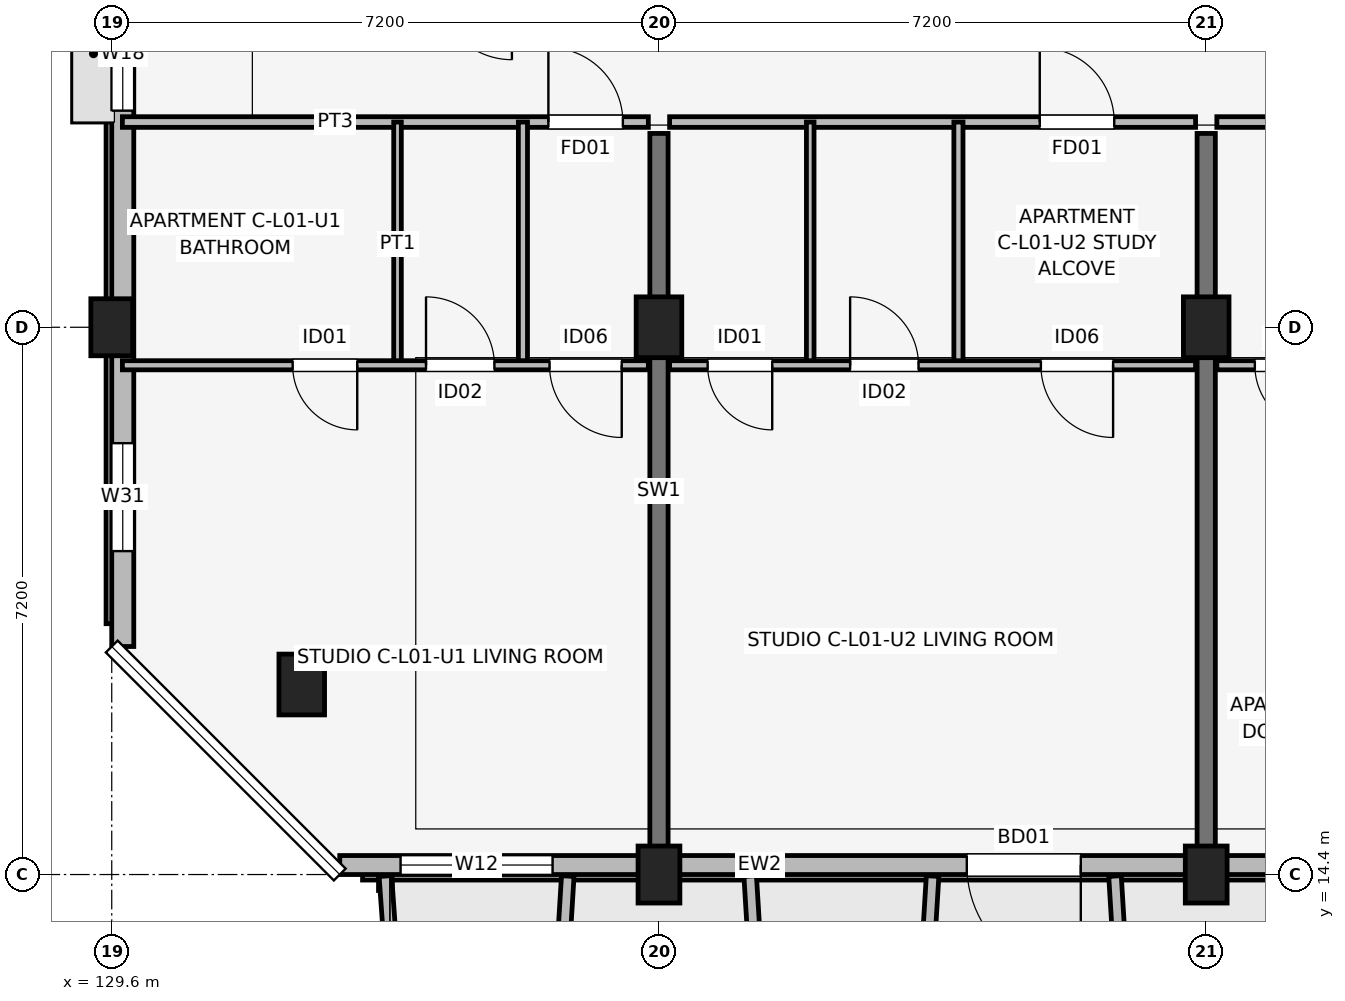
"""IFC4 building model, lengths in metres.
Left out: names, types, materials, properties, quantities, classifications, styles, units other than length and angle.
Written with IfcOpenShell. Run it as: python <this file> out.ifc"""

import sys

from ifc_helpers import new_model, si_unit, direction, frame, frame_2d, origin, origin_2d, place, context, subcontext, project, spatial, rectangle, extrude, element, fill, save


model = new_model("IFC4")
c1 = context("Model", 3, precision=1e-05, world=origin(), true_north=direction((0.0, 1.0)))
c2 = subcontext(c1, "Body", "Model", "MODEL_VIEW")
j1 = project(units=[si_unit("LENGTHUNIT", "METRE"), si_unit("PLANEANGLEUNIT", "RADIAN")], contexts=[c1])
p1 = place(None, origin())
s1 = spatial("IfcSite", under=j1, at=p1, CompositionType="ELEMENT")
p2 = place(p1, origin())
s2 = spatial("IfcBuilding", under=s1, at=p2, CompositionType="ELEMENT")
p3 = place(p2, frame((0.0, 0.0, 4.5)))
s3 = spatial("IfcBuildingStorey", under=s2, at=p3, CompositionType="ELEMENT", Elevation=4.5)
p4 = place(p3, frame((132.1, 16.9, 0.0), z_axis=(0.0, 0.0, 1.0), x_axis=(1.0, 0.0, 0.0)))
e1 = element("IfcColumn", 1, at=p4, inside=s3, PredefinedType="COLUMN", context=c2, shape_type="SweptSolid", body=[
    extrude(rectangle(XDim=0.6, YDim=0.8, at=origin_2d()), origin(), (0.0, 0.0, 1.0), 4.2),
])
for number, where, z_axis, x_axis in (
    (2, (129.6, 21.6, 0.0), (0.0, 0.0, 1.0), (1.0, 0.0, 0.0)),
    (3, (136.8, 14.4, 0.0), (0.0, 0.0, 1.0), (1.0, 0.0, 0.0)),
):
    element("IfcColumn", number, at=place(p3, frame(where, z_axis=z_axis, x_axis=x_axis)), inside=s3, PredefinedType="COLUMN", context=c2, shape_type="SweptSolid", body=[
        extrude(rectangle(XDim=0.55, YDim=0.75, at=origin_2d()), origin(), (0.0, 0.0, 1.0), 4.2),
    ])
p5 = place(p3, frame((136.8, 21.6, 0.0), z_axis=(0.0, 0.0, 1.0), x_axis=(1.0, 0.0, 0.0)))
e4 = element("IfcColumn", 4, at=p5, inside=s3, PredefinedType="COLUMN", context=c2, shape_type="SweptSolid", body=[
    extrude(rectangle(XDim=0.6, YDim=0.8, at=origin_2d()), origin(), (0.0, 0.0, 1.0), 4.2),
])
p6 = place(p3, frame((144.0, 14.4, 0.0), z_axis=(0.0, 0.0, 1.0), x_axis=(1.0, 0.0, 0.0)))
e5 = element("IfcColumn", 5, at=p6, inside=s3, PredefinedType="COLUMN", context=c2, shape_type="SweptSolid", body=[
    extrude(rectangle(XDim=0.55, YDim=0.75, at=origin_2d()), origin(), (0.0, 0.0, 1.0), 4.2),
])
p7 = place(p3, frame((144.0, 21.6, 0.0), z_axis=(0.0, 0.0, 1.0), x_axis=(1.0, 0.0, 0.0)))
e6 = element("IfcColumn", 6, at=p7, inside=s3, PredefinedType="COLUMN", context=c2, shape_type="SweptSolid", body=[
    extrude(rectangle(XDim=0.6, YDim=0.8, at=origin_2d()), origin(), (0.0, 0.0, 1.0), 4.2),
])
for number, where, z_axis, x_axis in (
    (7, (136.8, 14.75, 0.0), (0.0, 0.0, 1.0), (0.0, 1.0, 0.0)),
    (8, (144.0, 14.75, 0.0), (0.0, 0.0, 1.0), (0.0, 1.0, 0.0)),
):
    element("IfcWall", number, at=place(p3, frame(where, z_axis=z_axis, x_axis=x_axis)), inside=s3, PredefinedType="SHEAR", context=c2, shape_type="SweptSolid", body=[
        extrude(rectangle(XDim=9.4, YDim=0.24, at=frame_2d((4.7, 0.0))), origin(), (0.0, 0.0, 1.0), 4.2),
    ])
p8 = place(p3, frame((132.6, 14.525, 0.0), z_axis=(0.0, 0.0, 1.0), x_axis=(1.0, 0.0, 0.0)))
e9 = element("IfcWall", 9, at=p8, inside=s3, PredefinedType="SOLIDWALL", context=c2, shape_type="SweptSolid", body=[
    extrude(rectangle(XDim=30.0, YDim=0.25, at=frame_2d((15.0, 0.0))), origin(), (0.0, 0.0, 1.0), 3.48),
])
p9 = place(p8, frame((9.75, 0.0, 0.0), z_axis=(0.0, 0.0, 1.0), x_axis=(-1.0, 0.0, 0.0)))
e10 = element("IfcOpeningElement", 10, at=p9, cuts=e9, PredefinedType="OPENING", context=c2, shape_type="SweptSolid", body=[
    extrude(rectangle(XDim=1.5, YDim=2.15, at=frame_2d((0.75, 1.075))), frame((0.0, 0.135, 0.0), z_axis=(0.0, -1.0, 0.0), x_axis=(1.0, 0.0, 0.0)), (0.0, 0.0, 1.0), 0.27),
])
p10 = place(p8, frame((24.3, 0.0, 0.0), z_axis=(0.0, 0.0, 1.0), x_axis=(-1.0, 0.0, 0.0)))
e11 = element("IfcOpeningElement", 11, at=p10, cuts=e9, PredefinedType="OPENING", context=c2, shape_type="SweptSolid", body=[
    extrude(rectangle(XDim=1.8, YDim=2.15, at=frame_2d((0.9, 1.075))), frame((0.0, 0.135, 0.0), z_axis=(0.0, -1.0, 0.0), x_axis=(1.0, 0.0, 0.0)), (0.0, 0.0, 1.0), 0.27),
])
p11 = place(p8, frame((0.8, 0.0, 0.7)))
e12 = element("IfcOpeningElement", 12, at=p11, cuts=e9, PredefinedType="OPENING", context=c2, shape_type="SweptSolid", body=[
    extrude(rectangle(XDim=2.0, YDim=1.65, at=frame_2d((1.0, 0.825))), frame((0.0, 0.135, 0.0), z_axis=(0.0, -1.0, 0.0), x_axis=(1.0, 0.0, 0.0)), (0.0, 0.0, 1.0), 0.27),
])
p12 = place(p8, frame((12.725, 0.0, 0.7)))
e13 = element("IfcOpeningElement", 13, at=p12, cuts=e9, PredefinedType="OPENING", context=c2, shape_type="SweptSolid", body=[
    extrude(rectangle(XDim=2.15, YDim=1.65, at=frame_2d((1.075, 0.825))), frame((0.0, 0.135, 0.0), z_axis=(0.0, -1.0, 0.0), x_axis=(1.0, 0.0, 0.0)), (0.0, 0.0, 1.0), 0.27),
])
p13 = place(p8, frame((15.915, 0.0, 0.75)))
e14 = element("IfcOpeningElement", 14, at=p13, cuts=e9, PredefinedType="OPENING", context=c2, shape_type="SweptSolid", body=[
    extrude(rectangle(XDim=1.22, YDim=1.5, at=frame_2d((0.61, 0.75))), frame((0.0, 0.135, 0.0), z_axis=(0.0, -1.0, 0.0), x_axis=(1.0, 0.0, 0.0)), (0.0, 0.0, 1.0), 0.27),
])
p14 = place(p8, frame((19.058, 0.0, 0.75)))
e15 = element("IfcOpeningElement", 15, at=p14, cuts=e9, PredefinedType="OPENING", context=c2, shape_type="SweptSolid", body=[
    extrude(rectangle(XDim=0.6, YDim=1.25, at=frame_2d((0.3, 0.625))), frame((0.0, 0.135, 0.0), z_axis=(0.0, -1.0, 0.0), x_axis=(1.0, 0.0, 0.0)), (0.0, 0.0, 1.0), 0.27),
])
p15 = place(p8, frame((26.258, 0.0, 0.75)))
e16 = element("IfcOpeningElement", 16, at=p15, cuts=e9, PredefinedType="OPENING", context=c2, shape_type="SweptSolid", body=[
    extrude(rectangle(XDim=0.6, YDim=1.25, at=frame_2d((0.3, 0.625))), frame((0.0, 0.135, 0.0), z_axis=(0.0, -1.0, 0.0), x_axis=(1.0, 0.0, 0.0)), (0.0, 0.0, 1.0), 0.27),
])
p16 = place(p8, frame((28.3, 0.0, 0.75)))
e17 = element("IfcOpeningElement", 17, at=p16, cuts=e9, PredefinedType="OPENING", context=c2, shape_type="SweptSolid", body=[
    extrude(rectangle(XDim=0.6, YDim=1.25, at=frame_2d((0.3, 0.625))), frame((0.0, 0.135, 0.0), z_axis=(0.0, -1.0, 0.0), x_axis=(1.0, 0.0, 0.0)), (0.0, 0.0, 1.0), 0.27),
])
p17 = place(p3, frame((129.745, 33.0, 0.0), z_axis=(0.0, 0.0, 1.0), x_axis=(0.0, -1.0, 0.0)))
e18 = element("IfcWall", 18, at=p17, inside=s3, PredefinedType="SOLIDWALL", context=c2, shape_type="SweptSolid", body=[
    extrude(rectangle(XDim=15.6, YDim=0.29, at=frame_2d((7.8, 0.0))), origin(), (0.0, 0.0, 1.0), 3.43),
])
p18 = place(p17, frame((7.05, 0.0, 1.05)))
e19 = element("IfcOpeningElement", 19, at=p18, cuts=e18, PredefinedType="OPENING", context=c2, shape_type="SweptSolid", body=[
    extrude(rectangle(XDim=1.5, YDim=1.15, at=frame_2d((0.75, 0.575))), frame((0.0, 0.155, 0.0), z_axis=(0.0, -1.0, 0.0), x_axis=(1.0, 0.0, 0.0)), (0.0, 0.0, 1.0), 0.31),
])
p19 = place(p17, frame((12.925, 0.0, 0.75)))
e20 = element("IfcOpeningElement", 20, at=p19, cuts=e18, PredefinedType="OPENING", context=c2, shape_type="SweptSolid", body=[
    extrude(rectangle(XDim=1.42, YDim=1.6, at=frame_2d((0.71, 0.8))), frame((0.0, 0.155, 0.0), z_axis=(0.0, -1.0, 0.0), x_axis=(1.0, 0.0, 0.0)), (0.0, 0.0, 1.0), 0.31),
])
p20 = place(p3, frame((133.2, 14.38, 0.0), z_axis=(0.0, 0.0, 1.0), x_axis=(0.071317687608, -0.997453651772, 0.0)))
e21 = element("IfcWall", 21, at=p20, inside=s3, PredefinedType="ELEMENTEDWALL", context=c2, shape_type="SweptSolid", body=[
    extrude(rectangle(XDim=1.965, YDim=0.165, at=frame_2d((0.982, 0.0))), origin(), (0.0, 0.0, 1.0), 4.0),
])
p21 = place(p3, frame((135.6, 14.38, 0.0), z_axis=(0.0, 0.0, 1.0), x_axis=(-0.061170732449, -0.998127317276, 0.0)))
e22 = element("IfcWall", 22, at=p21, inside=s3, PredefinedType="ELEMENTEDWALL", context=c2, shape_type="SweptSolid", body=[
    extrude(rectangle(XDim=1.964, YDim=0.165, at=frame_2d((0.982, 0.0))), origin(), (0.0, 0.0, 1.0), 4.0),
])
for number, where, z_axis, x_axis in (
    (23, (138.0, 14.38, 0.0), (0.0, 0.0, 1.0), (0.061, -0.998, 0.0)),
    (24, (140.4, 14.38, 0.0), (0.0, 0.0, 1.0), (-0.061, -0.998, 0.0)),
    (25, (142.8, 14.38, 0.0), (0.0, 0.0, 1.0), (0.061, -0.998, 0.0)),
):
    element("IfcWall", number, at=place(p3, frame(where, z_axis=z_axis, x_axis=x_axis)), inside=s3, PredefinedType="ELEMENTEDWALL", context=c2, shape_type="SweptSolid", body=[
        extrude(rectangle(XDim=1.964, YDim=0.165, at=frame_2d((0.982, 0.0))), origin(), (0.0, 0.0, 1.0), 3.5),
    ])
p22 = place(p3, frame((129.74, 24.3, 0.0), z_axis=(0.0, 0.0, 1.0), x_axis=(1.0, 0.0, 0.0)))
e26 = element("IfcWall", 26, at=p22, inside=s3, PredefinedType="PARTITIONING", context=c2, shape_type="SweptSolid", body=[
    extrude(rectangle(XDim=6.92, YDim=0.14, at=frame_2d((3.46, 0.0))), origin(), (0.0, 0.0, 1.0), 3.25),
])
p23 = place(p22, frame((5.605, 0.0, 0.0)))
e27 = element("IfcOpeningElement", 27, at=p23, cuts=e26, PredefinedType="OPENING", context=c2, shape_type="SweptSolid", body=[
    extrude(rectangle(XDim=0.98, YDim=2.1, at=frame_2d((0.49, 1.05))), frame((0.0, 0.08, 0.0), z_axis=(0.0, -1.0, 0.0), x_axis=(1.0, 0.0, 0.0)), (0.0, 0.0, 1.0), 0.16),
])
p24 = place(p3, frame((133.36, 21.1, 0.0), z_axis=(0.0, 0.0, 1.0), x_axis=(0.0, 1.0, 0.0)))
e28 = element("IfcWall", 28, at=p24, inside=s3, PredefinedType="PARTITIONING", context=c2, shape_type="SweptSolid", body=[
    extrude(rectangle(XDim=3.2, YDim=0.1, at=frame_2d((1.6, 0.0))), origin(), (0.0, 0.0, 1.0), 3.25),
])
p25 = place(p3, frame((135.01, 21.1, 0.0), z_axis=(0.0, 0.0, 1.0), x_axis=(0.0, 1.0, 0.0)))
e29 = element("IfcWall", 29, at=p25, inside=s3, PredefinedType="PARTITIONING", context=c2, shape_type="SweptSolid", body=[
    extrude(rectangle(XDim=3.2, YDim=0.12, at=frame_2d((1.6, 0.0))), origin(), (0.0, 0.0, 1.0), 3.25),
])
p26 = place(p3, frame((129.74, 21.1, 0.0), z_axis=(0.0, 0.0, 1.0), x_axis=(1.0, 0.0, 0.0)))
e30 = element("IfcWall", 30, at=p26, inside=s3, PredefinedType="PARTITIONING", context=c2, shape_type="SweptSolid", body=[
    extrude(rectangle(XDim=6.92, YDim=0.12, at=frame_2d((3.46, 0.0))), origin(), (0.0, 0.0, 1.0), 3.25),
])
p27 = place(p26, frame((3.09, 0.0, 0.0), z_axis=(0.0, 0.0, 1.0), x_axis=(-1.0, 0.0, 0.0)))
e31 = element("IfcOpeningElement", 31, at=p27, cuts=e30, PredefinedType="OPENING", context=c2, shape_type="SweptSolid", body=[
    extrude(rectangle(XDim=0.85, YDim=2.08, at=frame_2d((0.425, 1.04))), frame((0.0, 0.07, 0.0), z_axis=(0.0, -1.0, 0.0), x_axis=(1.0, 0.0, 0.0)), (0.0, 0.0, 1.0), 0.14),
])
p28 = place(p26, frame((3.995, 0.0, 0.0)))
e32 = element("IfcOpeningElement", 32, at=p28, cuts=e30, PredefinedType="OPENING", context=c2, shape_type="SweptSolid", body=[
    extrude(rectangle(XDim=0.9, YDim=2.08, at=frame_2d((0.45, 1.04))), frame((0.0, 0.07, 0.0), z_axis=(0.0, -1.0, 0.0), x_axis=(1.0, 0.0, 0.0)), (0.0, 0.0, 1.0), 0.14),
])
p29 = place(p26, frame((6.57, 0.0, 0.0), z_axis=(0.0, 0.0, 1.0), x_axis=(-1.0, 0.0, 0.0)))
e33 = element("IfcOpeningElement", 33, at=p29, cuts=e30, PredefinedType="OPENING", context=c2, shape_type="SweptSolid", body=[
    extrude(rectangle(XDim=0.95, YDim=2.08, at=frame_2d((0.475, 1.04))), frame((0.0, 0.07, 0.0), z_axis=(0.0, -1.0, 0.0), x_axis=(1.0, 0.0, 0.0)), (0.0, 0.0, 1.0), 0.14),
])
p30 = place(p3, frame((136.94, 24.3, 0.0), z_axis=(0.0, 0.0, 1.0), x_axis=(1.0, 0.0, 0.0)))
e34 = element("IfcWall", 34, at=p30, inside=s3, PredefinedType="PARTITIONING", context=c2, shape_type="SweptSolid", body=[
    extrude(rectangle(XDim=6.92, YDim=0.14, at=frame_2d((3.46, 0.0))), origin(), (0.0, 0.0, 1.0), 3.25),
])
p31 = place(p30, frame((4.87, 0.0, 0.0)))
e35 = element("IfcOpeningElement", 35, at=p31, cuts=e34, PredefinedType="OPENING", context=c2, shape_type="SweptSolid", body=[
    extrude(rectangle(XDim=0.98, YDim=2.1, at=frame_2d((0.49, 1.05))), frame((0.0, 0.08, 0.0), z_axis=(0.0, -1.0, 0.0), x_axis=(1.0, 0.0, 0.0)), (0.0, 0.0, 1.0), 0.16),
])
p32 = place(p3, frame((138.79, 21.1, 0.0), z_axis=(0.0, 0.0, 1.0), x_axis=(0.0, 1.0, 0.0)))
e36 = element("IfcWall", 36, at=p32, inside=s3, PredefinedType="PARTITIONING", context=c2, shape_type="SweptSolid", body=[
    extrude(rectangle(XDim=3.2, YDim=0.1, at=frame_2d((1.6, 0.0))), origin(), (0.0, 0.0, 1.0), 3.25),
])
p33 = place(p3, frame((140.74, 21.1, 0.0), z_axis=(0.0, 0.0, 1.0), x_axis=(0.0, 1.0, 0.0)))
e37 = element("IfcWall", 37, at=p33, inside=s3, PredefinedType="PARTITIONING", context=c2, shape_type="SweptSolid", body=[
    extrude(rectangle(XDim=3.2, YDim=0.12, at=frame_2d((1.6, 0.0))), origin(), (0.0, 0.0, 1.0), 3.25),
])
p34 = place(p3, frame((136.94, 21.1, 0.0), z_axis=(0.0, 0.0, 1.0), x_axis=(1.0, 0.0, 0.0)))
e38 = element("IfcWall", 38, at=p34, inside=s3, PredefinedType="PARTITIONING", context=c2, shape_type="SweptSolid", body=[
    extrude(rectangle(XDim=6.92, YDim=0.12, at=frame_2d((3.46, 0.0))), origin(), (0.0, 0.0, 1.0), 3.25),
])
p35 = place(p34, frame((1.35, 0.0, 0.0), z_axis=(0.0, 0.0, 1.0), x_axis=(-1.0, 0.0, 0.0)))
e39 = element("IfcOpeningElement", 39, at=p35, cuts=e38, PredefinedType="OPENING", context=c2, shape_type="SweptSolid", body=[
    extrude(rectangle(XDim=0.85, YDim=2.08, at=frame_2d((0.425, 1.04))), frame((0.0, 0.07, 0.0), z_axis=(0.0, -1.0, 0.0), x_axis=(1.0, 0.0, 0.0)), (0.0, 0.0, 1.0), 0.14),
])
p36 = place(p34, frame((2.375, 0.0, 0.0)))
e40 = element("IfcOpeningElement", 40, at=p36, cuts=e38, PredefinedType="OPENING", context=c2, shape_type="SweptSolid", body=[
    extrude(rectangle(XDim=0.9, YDim=2.08, at=frame_2d((0.45, 1.04))), frame((0.0, 0.07, 0.0), z_axis=(0.0, -1.0, 0.0), x_axis=(1.0, 0.0, 0.0)), (0.0, 0.0, 1.0), 0.14),
])
p37 = place(p34, frame((5.835, 0.0, 0.0), z_axis=(0.0, 0.0, 1.0), x_axis=(-1.0, 0.0, 0.0)))
e41 = element("IfcOpeningElement", 41, at=p37, cuts=e38, PredefinedType="OPENING", context=c2, shape_type="SweptSolid", body=[
    extrude(rectangle(XDim=0.95, YDim=2.08, at=frame_2d((0.475, 1.04))), frame((0.0, 0.07, 0.0), z_axis=(0.0, -1.0, 0.0), x_axis=(1.0, 0.0, 0.0)), (0.0, 0.0, 1.0), 0.14),
])
p38 = place(p3, frame((144.14, 24.3, 0.0), z_axis=(0.0, 0.0, 1.0), x_axis=(1.0, 0.0, 0.0)))
e42 = element("IfcWall", 42, at=p38, inside=s3, PredefinedType="PARTITIONING", context=c2, shape_type="SweptSolid", body=[
    extrude(rectangle(XDim=6.92, YDim=0.14, at=frame_2d((3.46, 0.0))), origin(), (0.0, 0.0, 1.0), 3.25),
])
p39 = place(p38, frame((5.02, 0.0, 0.0)))
e43 = element("IfcOpeningElement", 43, at=p39, cuts=e42, PredefinedType="OPENING", context=c2, shape_type="SweptSolid", body=[
    extrude(rectangle(XDim=0.98, YDim=2.1, at=frame_2d((0.49, 1.05))), frame((0.0, 0.08, 0.0), z_axis=(0.0, -1.0, 0.0), x_axis=(1.0, 0.0, 0.0)), (0.0, 0.0, 1.0), 0.16),
])
p40 = place(p3, frame((144.14, 21.1, 0.0), z_axis=(0.0, 0.0, 1.0), x_axis=(1.0, 0.0, 0.0)))
e44 = element("IfcWall", 44, at=p40, inside=s3, PredefinedType="PARTITIONING", context=c2, shape_type="SweptSolid", body=[
    extrude(rectangle(XDim=6.92, YDim=0.12, at=frame_2d((3.46, 0.0))), origin(), (0.0, 0.0, 1.0), 3.25),
])
p41 = place(p40, frame((1.35, 0.0, 0.0), z_axis=(0.0, 0.0, 1.0), x_axis=(-1.0, 0.0, 0.0)))
e45 = element("IfcOpeningElement", 45, at=p41, cuts=e44, PredefinedType="OPENING", context=c2, shape_type="SweptSolid", body=[
    extrude(rectangle(XDim=0.85, YDim=2.08, at=frame_2d((0.425, 1.04))), frame((0.0, 0.07, 0.0), z_axis=(0.0, -1.0, 0.0), x_axis=(1.0, 0.0, 0.0)), (0.0, 0.0, 1.0), 0.14),
])
p42 = place(p40, frame((2.525, 0.0, 0.0)))
e46 = element("IfcOpeningElement", 46, at=p42, cuts=e44, PredefinedType="OPENING", context=c2, shape_type="SweptSolid", body=[
    extrude(rectangle(XDim=0.9, YDim=2.08, at=frame_2d((0.45, 1.04))), frame((0.0, 0.07, 0.0), z_axis=(0.0, -1.0, 0.0), x_axis=(1.0, 0.0, 0.0)), (0.0, 0.0, 1.0), 0.14),
])
p43 = place(p40, frame((5.985, 0.0, 0.0), z_axis=(0.0, 0.0, 1.0), x_axis=(-1.0, 0.0, 0.0)))
e47 = element("IfcOpeningElement", 47, at=p43, cuts=e44, PredefinedType="OPENING", context=c2, shape_type="SweptSolid", body=[
    extrude(rectangle(XDim=0.95, YDim=2.08, at=frame_2d((0.475, 1.04))), frame((0.0, 0.07, 0.0), z_axis=(0.0, -1.0, 0.0), x_axis=(1.0, 0.0, 0.0)), (0.0, 0.0, 1.0), 0.14),
])
p44 = place(p9, origin())
e48 = element("IfcDoor", 48, at=p44, inside=s3, OperationType="SINGLE_SWING_RIGHT", PredefinedType="DOOR", context=c2, shape_type="SweptSolid", body=[
    extrude(rectangle(XDim=1.5, YDim=2.15, at=frame_2d((0.75, 1.075))), frame((0.0, 0.025, 0.0), z_axis=(0.0, -1.0, 0.0), x_axis=(1.0, 0.0, 0.0)), (0.0, 0.0, 1.0), 0.05),
])
fill(e10, e48)
p45 = place(p11, origin())
e49 = element("IfcWindow", 49, at=p45, inside=s3, PartitioningType="SINGLE_PANEL", PredefinedType="WINDOW", context=c2, shape_type="SweptSolid", body=[
    extrude(rectangle(XDim=2.0, YDim=1.65, at=frame_2d((1.0, 0.825))), frame((0.0, 0.03, 0.0), z_axis=(0.0, -1.0, 0.0), x_axis=(1.0, 0.0, 0.0)), (0.0, 0.0, 1.0), 0.06),
])
fill(e12, e49)
p46 = place(p18, origin())
e50 = element("IfcWindow", 50, at=p46, inside=s3, PartitioningType="SINGLE_PANEL", PredefinedType="WINDOW", context=c2, shape_type="SweptSolid", body=[
    extrude(rectangle(XDim=1.5, YDim=1.15, at=frame_2d((0.75, 0.575))), frame((0.0, 0.03, 0.0), z_axis=(0.0, -1.0, 0.0), x_axis=(1.0, 0.0, 0.0)), (0.0, 0.0, 1.0), 0.06),
])
fill(e19, e50)
p47 = place(p19, origin())
e51 = element("IfcWindow", 51, at=p47, inside=s3, PartitioningType="SINGLE_PANEL", PredefinedType="WINDOW", context=c2, shape_type="SweptSolid", body=[
    extrude(rectangle(XDim=1.42, YDim=1.6, at=frame_2d((0.71, 0.8))), frame((0.0, 0.03, 0.0), z_axis=(0.0, -1.0, 0.0), x_axis=(1.0, 0.0, 0.0)), (0.0, 0.0, 1.0), 0.06),
])
fill(e20, e51)
p48 = place(p23, origin())
e52 = element("IfcDoor", 52, at=p48, inside=s3, OperationType="SINGLE_SWING_LEFT", PredefinedType="DOOR", context=c2, shape_type="SweptSolid", body=[
    extrude(rectangle(XDim=0.98, YDim=2.1, at=frame_2d((0.49, 1.05))), frame((0.0, 0.025, 0.0), z_axis=(0.0, -1.0, 0.0), x_axis=(1.0, 0.0, 0.0)), (0.0, 0.0, 1.0), 0.05),
])
fill(e27, e52)
p49 = place(p27, origin())
e53 = element("IfcDoor", 53, at=p49, inside=s3, OperationType="SINGLE_SWING_RIGHT", PredefinedType="DOOR", context=c2, shape_type="SweptSolid", body=[
    extrude(rectangle(XDim=0.85, YDim=2.08, at=frame_2d((0.425, 1.04))), frame((0.0, 0.025, 0.0), z_axis=(0.0, -1.0, 0.0), x_axis=(1.0, 0.0, 0.0)), (0.0, 0.0, 1.0), 0.05),
])
fill(e31, e53)
p50 = place(p28, origin())
e54 = element("IfcDoor", 54, at=p50, inside=s3, OperationType="SINGLE_SWING_LEFT", PredefinedType="DOOR", context=c2, shape_type="SweptSolid", body=[
    extrude(rectangle(XDim=0.9, YDim=2.08, at=frame_2d((0.45, 1.04))), frame((0.0, 0.025, 0.0), z_axis=(0.0, -1.0, 0.0), x_axis=(1.0, 0.0, 0.0)), (0.0, 0.0, 1.0), 0.05),
])
fill(e32, e54)
p51 = place(p29, origin())
e55 = element("IfcDoor", 55, at=p51, inside=s3, OperationType="SINGLE_SWING_RIGHT", PredefinedType="DOOR", context=c2, shape_type="SweptSolid", body=[
    extrude(rectangle(XDim=0.95, YDim=2.08, at=frame_2d((0.475, 1.04))), frame((0.0, 0.025, 0.0), z_axis=(0.0, -1.0, 0.0), x_axis=(1.0, 0.0, 0.0)), (0.0, 0.0, 1.0), 0.05),
])
fill(e33, e55)
p52 = place(p31, origin())
e56 = element("IfcDoor", 56, at=p52, inside=s3, OperationType="SINGLE_SWING_LEFT", PredefinedType="DOOR", context=c2, shape_type="SweptSolid", body=[
    extrude(rectangle(XDim=0.98, YDim=2.1, at=frame_2d((0.49, 1.05))), frame((0.0, 0.025, 0.0), z_axis=(0.0, -1.0, 0.0), x_axis=(1.0, 0.0, 0.0)), (0.0, 0.0, 1.0), 0.05),
])
fill(e35, e56)
p53 = place(p35, origin())
e57 = element("IfcDoor", 57, at=p53, inside=s3, OperationType="SINGLE_SWING_RIGHT", PredefinedType="DOOR", context=c2, shape_type="SweptSolid", body=[
    extrude(rectangle(XDim=0.85, YDim=2.08, at=frame_2d((0.425, 1.04))), frame((0.0, 0.025, 0.0), z_axis=(0.0, -1.0, 0.0), x_axis=(1.0, 0.0, 0.0)), (0.0, 0.0, 1.0), 0.05),
])
fill(e39, e57)
p54 = place(p36, origin())
e58 = element("IfcDoor", 58, at=p54, inside=s3, OperationType="SINGLE_SWING_LEFT", PredefinedType="DOOR", context=c2, shape_type="SweptSolid", body=[
    extrude(rectangle(XDim=0.9, YDim=2.08, at=frame_2d((0.45, 1.04))), frame((0.0, 0.025, 0.0), z_axis=(0.0, -1.0, 0.0), x_axis=(1.0, 0.0, 0.0)), (0.0, 0.0, 1.0), 0.05),
])
fill(e40, e58)
p55 = place(p37, origin())
e59 = element("IfcDoor", 59, at=p55, inside=s3, OperationType="SINGLE_SWING_RIGHT", PredefinedType="DOOR", context=c2, shape_type="SweptSolid", body=[
    extrude(rectangle(XDim=0.95, YDim=2.08, at=frame_2d((0.475, 1.04))), frame((0.0, 0.025, 0.0), z_axis=(0.0, -1.0, 0.0), x_axis=(1.0, 0.0, 0.0)), (0.0, 0.0, 1.0), 0.05),
])
fill(e41, e59)
p56 = place(p41, origin())
e60 = element("IfcDoor", 60, at=p56, inside=s3, OperationType="SINGLE_SWING_RIGHT", PredefinedType="DOOR", context=c2, shape_type="SweptSolid", body=[
    extrude(rectangle(XDim=0.85, YDim=2.08, at=frame_2d((0.425, 1.04))), frame((0.0, 0.025, 0.0), z_axis=(0.0, -1.0, 0.0), x_axis=(1.0, 0.0, 0.0)), (0.0, 0.0, 1.0), 0.05),
])
fill(e45, e60)
save(model, sys.argv[1])
